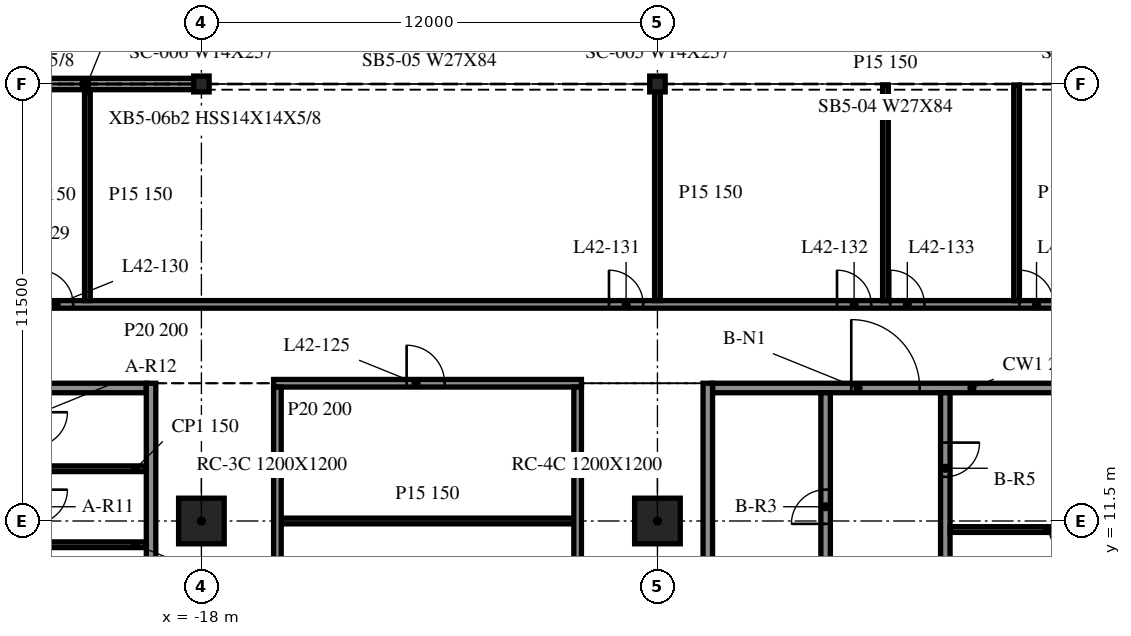
"""IFC4 building model, lengths in metres.
Left out: names, types, materials, properties, quantities, classifications, styles, units other than length and angle.
Written with IfcOpenShell. Run it as: python <this file> out.ifc"""

import sys

from ifc_helpers import new_model, si_unit, direction, frame, frame_2d, origin, origin_2d, place, context, subcontext, project, spatial, rectangle, i_section, extrude, element, fill, save


model = new_model("IFC4")
c1 = context("Model", 3, precision=1e-05, world=origin(), true_north=direction((0.0, 1.0)))
c2 = subcontext(c1, "Body", "Model", "MODEL_VIEW")
j1 = project(units=[si_unit("LENGTHUNIT", "METRE"), si_unit("PLANEANGLEUNIT", "RADIAN")], contexts=[c1])
p1 = place(None, origin())
s1 = spatial("IfcSite", under=j1, at=p1, CompositionType="ELEMENT")
p2 = place(p1, origin())
s2 = spatial("IfcBuilding", under=s1, at=p2, CompositionType="ELEMENT")
p3 = place(p2, frame((0.0, 0.0, 178.2)))
s3 = spatial("IfcBuildingStorey", under=s2, at=p3, CompositionType="ELEMENT", Elevation=178.2)
for number, where, z_axis, x_axis in (
    (1, (-18.0, 11.5, -0.34), (0.0, 0.0, 1.0), (1.0, 0.0, 0.0)),
    (2, (-6.0, 11.5, -0.34), (0.0, 0.0, 1.0), (1.0, 0.0, 0.0)),
):
    element("IfcColumn", number, at=place(p3, frame(where, z_axis=z_axis, x_axis=x_axis)), inside=s3, PredefinedType="COLUMN", context=c2, shape_type="SweptSolid", body=[
        extrude(rectangle(XDim=1.2, YDim=1.2, at=origin_2d()), origin(), (0.0, 0.0, 1.0), 3.8),
    ])
for number, where, z_axis, x_axis in (
    (3, (-6.0, 23.0, -0.34), (0.0, 0.0, 1.0), (1.0, 0.0, 0.0)),
    (4, (-18.0, 23.0, -0.34), (0.0, 0.0, 1.0), (1.0, 0.0, 0.0)),
):
    element("IfcColumn", number, at=place(p3, frame(where, z_axis=z_axis, x_axis=x_axis)), inside=s3, PredefinedType="COLUMN", context=c2, shape_type="SweptSolid", body=[
        extrude(i_section(OverallWidth=0.406, OverallDepth=0.417, WebThickness=0.03, FlangeThickness=0.048, at=origin_2d()), origin(), (0.0, 0.0, 1.0), 3.8),
    ])
p4 = place(p3, frame((-18.015, 23.0, 0.0), z_axis=(0.0, 0.0, 1.0), x_axis=(-1.0, 0.0, 0.0)))
e5 = element("IfcWall", 5, at=p4, inside=s3, PredefinedType="NOTDEFINED", context=c2, shape_type="SweptSolid", body=[
    extrude(rectangle(XDim=11.97, YDim=0.3, at=frame_2d((5.985, 0.0))), origin(), (0.0, 0.0, 1.0), 2.782),
])
p5 = place(p3, frame((-19.325, -9.125, 0.0), z_axis=(0.0, 0.0, 1.0), x_axis=(0.0, 1.0, 0.0)))
e6 = element("IfcWall", 6, at=p5, inside=s3, PredefinedType="SOLIDWALL", context=c2, shape_type="SweptSolid", body=[
    extrude(rectangle(XDim=24.25, YDim=0.25, at=frame_2d((12.125, 0.0))), origin(), (0.0, 0.0, 1.0), 3.46),
])
p6 = place(p3, frame((-28.55, 15.0, 0.0), z_axis=(0.0, 0.0, 1.0), x_axis=(1.0, 0.0, 0.0)))
e7 = element("IfcWall", 7, at=p6, inside=s3, PredefinedType="SOLIDWALL", context=c2, shape_type="SweptSolid", body=[
    extrude(rectangle(XDim=9.1, YDim=0.25, at=frame_2d((4.55, 0.0))), origin(), (0.0, 0.0, 1.0), 3.46),
])
p7 = place(p6, frame((3.65, 0.0, 0.0)))
e8 = element("IfcOpeningElement", 8, at=p7, cuts=e7, PredefinedType="OPENING", context=c2, shape_type="SweptSolid", body=[
    extrude(rectangle(XDim=1.8, YDim=2.1, at=frame_2d((0.9, 1.05))), frame((0.0, 0.135, 0.0), z_axis=(0.0, -1.0, 0.0), x_axis=(1.0, 0.0, 0.0)), (0.0, 0.0, 1.0), 0.27),
])
for number, where, z_axis, x_axis in (
    (9, (-22.3, 10.875, 0.0), (0.0, 0.0, 1.0), (1.0, 0.0, 0.0)),
    (10, (-22.3, 12.875, 0.0), (0.0, 0.0, 1.0), (1.0, 0.0, 0.0)),
):
    element("IfcWall", number, at=place(p3, frame(where, z_axis=z_axis, x_axis=x_axis)), inside=s3, PredefinedType="PARTITIONING", context=c2, shape_type="SweptSolid", body=[
        extrude(rectangle(XDim=2.85, YDim=0.15, at=frame_2d((1.425, 0.0))), origin(), (0.0, 0.0, 1.0), 3.46),
    ])
p8 = place(p3, frame((-4.675, 15.125, 0.0), z_axis=(0.0, 0.0, 1.0), x_axis=(0.0, -1.0, 0.0)))
e11 = element("IfcWall", 11, at=p8, inside=s3, PredefinedType="SOLIDWALL", context=c2, shape_type="SweptSolid", body=[
    extrude(rectangle(XDim=24.25, YDim=0.25, at=frame_2d((12.125, 0.0))), origin(), (0.0, 0.0, 1.0), 3.46),
])
p9 = place(p3, frame((-4.55, 15.0, 0.0), z_axis=(0.0, 0.0, 1.0), x_axis=(1.0, 0.0, 0.0)))
e12 = element("IfcWall", 12, at=p9, inside=s3, PredefinedType="SOLIDWALL", context=c2, shape_type="SweptSolid", body=[
    extrude(rectangle(XDim=9.1, YDim=0.25, at=frame_2d((4.55, 0.0))), origin(), (0.0, 0.0, 1.0), 3.46),
])
p10 = place(p9, frame((3.65, 0.0, 0.0)))
e13 = element("IfcOpeningElement", 13, at=p10, cuts=e12, PredefinedType="OPENING", context=c2, shape_type="SweptSolid", body=[
    extrude(rectangle(XDim=1.8, YDim=2.1, at=frame_2d((0.9, 1.05))), frame((0.0, 0.135, 0.0), z_axis=(0.0, -1.0, 0.0), x_axis=(1.0, 0.0, 0.0)), (0.0, 0.0, 1.0), 0.27),
])
p11 = place(p3, frame((-1.575, -8.875, 0.0), z_axis=(0.0, 0.0, 1.0), x_axis=(0.0, 1.0, 0.0)))
e14 = element("IfcWall", 14, at=p11, inside=s3, PredefinedType="SOLIDWALL", context=c2, shape_type="SweptSolid", body=[
    extrude(rectangle(XDim=23.75, YDim=0.25, at=frame_2d((11.875, 0.0))), origin(), (0.0, 0.0, 1.0), 3.46),
])
p12 = place(p11, frame((7.2, 0.0, 0.0)))
e15 = element("IfcOpeningElement", 15, at=p12, cuts=e14, PredefinedType="OPENING", context=c2, shape_type="SweptSolid", body=[
    extrude(rectangle(XDim=1.1, YDim=2.1, at=frame_2d((0.55, 1.05))), frame((0.0, 0.135, 0.0), z_axis=(0.0, -1.0, 0.0), x_axis=(1.0, 0.0, 0.0)), (0.0, 0.0, 1.0), 0.27),
])
p13 = place(p11, frame((9.95, 0.0, 0.0)))
e16 = element("IfcOpeningElement", 16, at=p13, cuts=e14, PredefinedType="OPENING", context=c2, shape_type="SweptSolid", body=[
    extrude(rectangle(XDim=1.1, YDim=2.1, at=frame_2d((0.55, 1.05))), frame((0.0, 0.135, 0.0), z_axis=(0.0, -1.0, 0.0), x_axis=(1.0, 0.0, 0.0)), (0.0, 0.0, 1.0), 0.27),
])
p14 = place(p11, frame((12.7, 0.0, 0.0)))
e17 = element("IfcOpeningElement", 17, at=p14, cuts=e14, PredefinedType="OPENING", context=c2, shape_type="SweptSolid", body=[
    extrude(rectangle(XDim=1.1, YDim=2.1, at=frame_2d((0.55, 1.05))), frame((0.0, 0.135, 0.0), z_axis=(0.0, -1.0, 0.0), x_axis=(1.0, 0.0, 0.0)), (0.0, 0.0, 1.0), 0.27),
])
p15 = place(p11, frame((15.45, 0.0, 0.0)))
e18 = element("IfcOpeningElement", 18, at=p15, cuts=e14, PredefinedType="OPENING", context=c2, shape_type="SweptSolid", body=[
    extrude(rectangle(XDim=1.1, YDim=2.1, at=frame_2d((0.55, 1.05))), frame((0.0, 0.135, 0.0), z_axis=(0.0, -1.0, 0.0), x_axis=(1.0, 0.0, 0.0)), (0.0, 0.0, 1.0), 0.27),
])
p16 = place(p11, frame((0.712, 0.0, 0.0)))
e19 = element("IfcOpeningElement", 19, at=p16, cuts=e14, PredefinedType="OPENING", context=c2, shape_type="SweptSolid", body=[
    extrude(rectangle(XDim=0.9, YDim=2.1, at=frame_2d((0.45, 1.05))), frame((0.0, 0.135, 0.0), z_axis=(0.0, -1.0, 0.0), x_axis=(1.0, 0.0, 0.0)), (0.0, 0.0, 1.0), 0.27),
])
p17 = place(p11, frame((3.788, 0.0, 0.0)))
e20 = element("IfcOpeningElement", 20, at=p17, cuts=e14, PredefinedType="OPENING", context=c2, shape_type="SweptSolid", body=[
    extrude(rectangle(XDim=0.9, YDim=2.1, at=frame_2d((0.45, 1.05))), frame((0.0, 0.135, 0.0), z_axis=(0.0, -1.0, 0.0), x_axis=(1.0, 0.0, 0.0)), (0.0, 0.0, 1.0), 0.27),
])
p18 = place(p11, frame((20.3, 0.0, 0.0)))
e21 = element("IfcOpeningElement", 21, at=p18, cuts=e14, PredefinedType="OPENING", context=c2, shape_type="SweptSolid", body=[
    extrude(rectangle(XDim=0.9, YDim=2.1, at=frame_2d((0.45, 1.05))), frame((0.0, 0.135, 0.0), z_axis=(0.0, -1.0, 0.0), x_axis=(1.0, 0.0, 0.0)), (0.0, 0.0, 1.0), 0.27),
])
p19 = place(p3, frame((1.575, 14.875, 0.0), z_axis=(0.0, 0.0, 1.0), x_axis=(0.0, -1.0, 0.0)))
e22 = element("IfcWall", 22, at=p19, inside=s3, PredefinedType="SOLIDWALL", context=c2, shape_type="SweptSolid", body=[
    extrude(rectangle(XDim=17.5, YDim=0.25, at=frame_2d((8.75, 0.0))), origin(), (0.0, 0.0, 1.0), 3.46),
])
p20 = place(p19, frame((15.45, 0.0, 0.0)))
e23 = element("IfcOpeningElement", 23, at=p20, cuts=e22, PredefinedType="OPENING", context=c2, shape_type="SweptSolid", body=[
    extrude(rectangle(XDim=1.1, YDim=2.1, at=frame_2d((0.55, 1.05))), frame((0.0, 0.135, 0.0), z_axis=(0.0, -1.0, 0.0), x_axis=(1.0, 0.0, 0.0)), (0.0, 0.0, 1.0), 0.27),
])
p21 = place(p19, frame((12.7, 0.0, 0.0)))
e24 = element("IfcOpeningElement", 24, at=p21, cuts=e22, PredefinedType="OPENING", context=c2, shape_type="SweptSolid", body=[
    extrude(rectangle(XDim=1.1, YDim=2.1, at=frame_2d((0.55, 1.05))), frame((0.0, 0.135, 0.0), z_axis=(0.0, -1.0, 0.0), x_axis=(1.0, 0.0, 0.0)), (0.0, 0.0, 1.0), 0.27),
])
p22 = place(p19, frame((9.95, 0.0, 0.0)))
e25 = element("IfcOpeningElement", 25, at=p22, cuts=e22, PredefinedType="OPENING", context=c2, shape_type="SweptSolid", body=[
    extrude(rectangle(XDim=1.1, YDim=2.1, at=frame_2d((0.55, 1.05))), frame((0.0, 0.135, 0.0), z_axis=(0.0, -1.0, 0.0), x_axis=(1.0, 0.0, 0.0)), (0.0, 0.0, 1.0), 0.27),
])
p23 = place(p19, frame((7.2, 0.0, 0.0)))
e26 = element("IfcOpeningElement", 26, at=p23, cuts=e22, PredefinedType="OPENING", context=c2, shape_type="SweptSolid", body=[
    extrude(rectangle(XDim=1.1, YDim=2.1, at=frame_2d((0.55, 1.05))), frame((0.0, 0.135, 0.0), z_axis=(0.0, -1.0, 0.0), x_axis=(1.0, 0.0, 0.0)), (0.0, 0.0, 1.0), 0.27),
])
p24 = place(p19, frame((4.387, 0.0, 0.0)))
e27 = element("IfcOpeningElement", 27, at=p24, cuts=e22, PredefinedType="OPENING", context=c2, shape_type="SweptSolid", body=[
    extrude(rectangle(XDim=0.9, YDim=2.1, at=frame_2d((0.45, 1.05))), frame((0.0, 0.135, 0.0), z_axis=(0.0, -1.0, 0.0), x_axis=(1.0, 0.0, 0.0)), (0.0, 0.0, 1.0), 0.27),
])
p25 = place(p19, frame((1.312, 0.0, 0.0)))
e28 = element("IfcOpeningElement", 28, at=p25, cuts=e22, PredefinedType="OPENING", context=c2, shape_type="SweptSolid", body=[
    extrude(rectangle(XDim=0.9, YDim=2.1, at=frame_2d((0.45, 1.05))), frame((0.0, 0.135, 0.0), z_axis=(0.0, -1.0, 0.0), x_axis=(1.0, 0.0, 0.0)), (0.0, 0.0, 1.0), 0.27),
])
p26 = place(p3, frame((1.7, 11.275, 0.0), z_axis=(0.0, 0.0, 1.0), x_axis=(1.0, 0.0, 0.0)))
e29 = element("IfcWall", 29, at=p26, inside=s3, PredefinedType="PARTITIONING", context=c2, shape_type="SweptSolid", body=[
    extrude(rectangle(XDim=2.85, YDim=0.15, at=frame_2d((1.425, 0.0))), origin(), (0.0, 0.0, 1.0), 3.46),
])
p27 = place(p3, frame((-15.9, 11.5, 0.0), z_axis=(0.0, 0.0, 1.0), x_axis=(1.0, 0.0, 0.0)))
e30 = element("IfcWall", 30, at=p27, inside=s3, PredefinedType="PARTITIONING", context=c2, shape_type="SweptSolid", body=[
    extrude(rectangle(XDim=7.7, YDim=0.15, at=frame_2d((3.85, 0.0))), origin(), (0.0, 0.0, 1.0), 3.46),
])
p28 = place(p3, frame((-16.1, 15.125, 0.0), z_axis=(0.0, 0.0, 1.0), x_axis=(1.0, 0.0, 0.0)))
e31 = element("IfcWall", 31, at=p28, inside=s3, PredefinedType="PARTITIONING", context=c2, shape_type="SweptSolid", body=[
    extrude(rectangle(XDim=8.1, YDim=0.2, at=frame_2d((4.05, 0.0))), origin(), (0.0, 0.0, 1.0), 3.46),
])
p29 = place(p28, frame((3.5, 0.0, 0.0)))
e32 = element("IfcOpeningElement", 32, at=p29, cuts=e31, PredefinedType="OPENING", context=c2, shape_type="SweptSolid", body=[
    extrude(rectangle(XDim=1.0, YDim=2.1, at=frame_2d((0.5, 1.05))), frame((0.0, 0.11, 0.0), z_axis=(0.0, -1.0, 0.0), x_axis=(1.0, 0.0, 0.0)), (0.0, 0.0, 1.0), 0.22),
])
p30 = place(p3, frame((-47.975, 17.2, 0.0), z_axis=(0.0, 0.0, 1.0), x_axis=(1.0, 0.0, 0.0)))
e33 = element("IfcWall", 33, at=p30, inside=s3, PredefinedType="PARTITIONING", context=c2, shape_type="SweptSolid", body=[
    extrude(rectangle(XDim=95.95, YDim=0.2, at=frame_2d((47.975, 0.0))), origin(), (0.0, 0.0, 1.0), 3.46),
])
p31 = place(p30, frame((13.7, 0.0, 0.0)))
e34 = element("IfcOpeningElement", 34, at=p31, cuts=e33, PredefinedType="OPENING", context=c2, shape_type="SweptSolid", body=[
    extrude(rectangle(XDim=0.9, YDim=2.1, at=frame_2d((0.45, 1.05))), frame((0.0, 0.11, 0.0), z_axis=(0.0, -1.0, 0.0), x_axis=(1.0, 0.0, 0.0)), (0.0, 0.0, 1.0), 0.22),
])
p32 = place(p30, frame((19.7, 0.0, 0.0)))
e35 = element("IfcOpeningElement", 35, at=p32, cuts=e33, PredefinedType="OPENING", context=c2, shape_type="SweptSolid", body=[
    extrude(rectangle(XDim=0.9, YDim=2.1, at=frame_2d((0.45, 1.05))), frame((0.0, 0.11, 0.0), z_axis=(0.0, -1.0, 0.0), x_axis=(1.0, 0.0, 0.0)), (0.0, 0.0, 1.0), 0.22),
])
p33 = place(p30, frame((23.1, 0.0, 0.0)))
e36 = element("IfcOpeningElement", 36, at=p33, cuts=e33, PredefinedType="OPENING", context=c2, shape_type="SweptSolid", body=[
    extrude(rectangle(XDim=0.9, YDim=2.1, at=frame_2d((0.45, 1.05))), frame((0.0, 0.11, 0.0), z_axis=(0.0, -1.0, 0.0), x_axis=(1.0, 0.0, 0.0)), (0.0, 0.0, 1.0), 0.22),
])
p34 = place(p30, frame((25.7, 0.0, 0.0)))
e37 = element("IfcOpeningElement", 37, at=p34, cuts=e33, PredefinedType="OPENING", context=c2, shape_type="SweptSolid", body=[
    extrude(rectangle(XDim=0.9, YDim=2.1, at=frame_2d((0.45, 1.05))), frame((0.0, 0.11, 0.0), z_axis=(0.0, -1.0, 0.0), x_axis=(1.0, 0.0, 0.0)), (0.0, 0.0, 1.0), 0.22),
])
p35 = place(p30, frame((40.7, 0.0, 0.0)))
e38 = element("IfcOpeningElement", 38, at=p35, cuts=e33, PredefinedType="OPENING", context=c2, shape_type="SweptSolid", body=[
    extrude(rectangle(XDim=0.9, YDim=2.1, at=frame_2d((0.45, 1.05))), frame((0.0, 0.11, 0.0), z_axis=(0.0, -1.0, 0.0), x_axis=(1.0, 0.0, 0.0)), (0.0, 0.0, 1.0), 0.22),
])
p36 = place(p30, frame((46.7, 0.0, 0.0)))
e39 = element("IfcOpeningElement", 39, at=p36, cuts=e33, PredefinedType="OPENING", context=c2, shape_type="SweptSolid", body=[
    extrude(rectangle(XDim=0.9, YDim=2.1, at=frame_2d((0.45, 1.05))), frame((0.0, 0.11, 0.0), z_axis=(0.0, -1.0, 0.0), x_axis=(1.0, 0.0, 0.0)), (0.0, 0.0, 1.0), 0.22),
])
p37 = place(p30, frame((48.1, 0.0, 0.0)))
e40 = element("IfcOpeningElement", 40, at=p37, cuts=e33, PredefinedType="OPENING", context=c2, shape_type="SweptSolid", body=[
    extrude(rectangle(XDim=0.9, YDim=2.1, at=frame_2d((0.45, 1.05))), frame((0.0, 0.11, 0.0), z_axis=(0.0, -1.0, 0.0), x_axis=(1.0, 0.0, 0.0)), (0.0, 0.0, 1.0), 0.22),
])
p38 = place(p30, frame((51.5, 0.0, 0.0)))
e41 = element("IfcOpeningElement", 41, at=p38, cuts=e33, PredefinedType="OPENING", context=c2, shape_type="SweptSolid", body=[
    extrude(rectangle(XDim=0.9, YDim=2.1, at=frame_2d((0.45, 1.05))), frame((0.0, 0.11, 0.0), z_axis=(0.0, -1.0, 0.0), x_axis=(1.0, 0.0, 0.0)), (0.0, 0.0, 1.0), 0.22),
])
p39 = place(p30, frame((54.5, 0.0, 0.0)))
e42 = element("IfcOpeningElement", 42, at=p39, cuts=e33, PredefinedType="OPENING", context=c2, shape_type="SweptSolid", body=[
    extrude(rectangle(XDim=0.9, YDim=2.1, at=frame_2d((0.45, 1.05))), frame((0.0, 0.11, 0.0), z_axis=(0.0, -1.0, 0.0), x_axis=(1.0, 0.0, 0.0)), (0.0, 0.0, 1.0), 0.22),
])
p40 = place(p30, frame((69.1, 0.0, 0.0)))
e43 = element("IfcOpeningElement", 43, at=p40, cuts=e33, PredefinedType="OPENING", context=c2, shape_type="SweptSolid", body=[
    extrude(rectangle(XDim=0.9, YDim=2.1, at=frame_2d((0.45, 1.05))), frame((0.0, 0.11, 0.0), z_axis=(0.0, -1.0, 0.0), x_axis=(1.0, 0.0, 0.0)), (0.0, 0.0, 1.0), 0.22),
])
p41 = place(p30, frame((75.1, 0.0, 0.0)))
e44 = element("IfcOpeningElement", 44, at=p41, cuts=e33, PredefinedType="OPENING", context=c2, shape_type="SweptSolid", body=[
    extrude(rectangle(XDim=0.9, YDim=2.1, at=frame_2d((0.45, 1.05))), frame((0.0, 0.11, 0.0), z_axis=(0.0, -1.0, 0.0), x_axis=(1.0, 0.0, 0.0)), (0.0, 0.0, 1.0), 0.22),
])
p42 = place(p30, frame((78.1, 0.0, 0.0)))
e45 = element("IfcOpeningElement", 45, at=p42, cuts=e33, PredefinedType="OPENING", context=c2, shape_type="SweptSolid", body=[
    extrude(rectangle(XDim=0.9, YDim=2.1, at=frame_2d((0.45, 1.05))), frame((0.0, 0.11, 0.0), z_axis=(0.0, -1.0, 0.0), x_axis=(1.0, 0.0, 0.0)), (0.0, 0.0, 1.0), 0.22),
])
p43 = place(p30, frame((81.1, 0.0, 0.0)))
e46 = element("IfcOpeningElement", 46, at=p43, cuts=e33, PredefinedType="OPENING", context=c2, shape_type="SweptSolid", body=[
    extrude(rectangle(XDim=0.9, YDim=2.1, at=frame_2d((0.45, 1.05))), frame((0.0, 0.11, 0.0), z_axis=(0.0, -1.0, 0.0), x_axis=(1.0, 0.0, 0.0)), (0.0, 0.0, 1.0), 0.22),
])
p44 = place(p3, frame((-21.0, 17.3, 0.0), z_axis=(0.0, 0.0, 1.0), x_axis=(0.0, 1.0, 0.0)))
e47 = element("IfcWall", 47, at=p44, inside=s3, PredefinedType="PARTITIONING", context=c2, shape_type="SweptSolid", body=[
    extrude(rectangle(XDim=5.55, YDim=0.15, at=frame_2d((2.775, 0.0))), origin(), (0.0, 0.0, 1.0), 3.46),
])
p45 = place(p3, frame((-16.0, -9.025, 0.0), z_axis=(0.0, 0.0, 1.0), x_axis=(0.0, 1.0, 0.0)))
e48 = element("IfcWall", 48, at=p45, inside=s3, PredefinedType="PARTITIONING", context=c2, shape_type="SweptSolid", body=[
    extrude(rectangle(XDim=24.05, YDim=0.2, at=frame_2d((12.025, 0.0))), origin(), (0.0, 0.0, 1.0), 3.46),
])
p46 = place(p45, frame((11.5, 0.0, 0.0)))
e49 = element("IfcOpeningElement", 49, at=p46, cuts=e48, PredefinedType="OPENING", context=c2, shape_type="SweptSolid", body=[
    extrude(rectangle(XDim=0.9, YDim=2.1, at=frame_2d((0.45, 1.05))), frame((0.0, 0.11, 0.0), z_axis=(0.0, -1.0, 0.0), x_axis=(1.0, 0.0, 0.0)), (0.0, 0.0, 1.0), 0.22),
])
p47 = place(p3, frame((-8.1, -9.025, 0.0), z_axis=(0.0, 0.0, 1.0), x_axis=(0.0, 1.0, 0.0)))
e50 = element("IfcWall", 50, at=p47, inside=s3, PredefinedType="PARTITIONING", context=c2, shape_type="SweptSolid", body=[
    extrude(rectangle(XDim=24.05, YDim=0.2, at=frame_2d((12.025, 0.0))), origin(), (0.0, 0.0, 1.0), 3.46),
])
for number, where, z_axis, x_axis in (
    (51, (-6.0, 17.3, 0.0), (0.0, 0.0, 1.0), (0.0, 1.0, 0.0)),
    (52, (0.0, 17.3, 0.0), (0.0, 0.0, 1.0), (0.0, 1.0, 0.0)),
    (53, (3.45, 17.3, 0.0), (0.0, 0.0, 1.0), (0.0, 1.0, 0.0)),
):
    element("IfcWall", number, at=place(p3, frame(where, z_axis=z_axis, x_axis=x_axis)), inside=s3, PredefinedType="PARTITIONING", context=c2, shape_type="SweptSolid", body=[
        extrude(rectangle(XDim=5.675, YDim=0.15, at=frame_2d((2.837, 0.0))), origin(), (0.0, 0.0, 1.0), 3.46),
    ])
p48 = place(p10, origin())
e54 = element("IfcDoor", 54, at=p48, inside=s3, OperationType="DOUBLE_DOOR_SINGLE_SWING", PredefinedType="DOOR", context=c2, shape_type="SweptSolid", body=[
    extrude(rectangle(XDim=1.8, YDim=2.1, at=frame_2d((0.9, 1.05))), frame((0.0, 0.025, 0.0), z_axis=(0.0, -1.0, 0.0), x_axis=(1.0, 0.0, 0.0)), (0.0, 0.0, 1.0), 0.05),
])
fill(e13, e54)
p49 = place(p18, origin())
e55 = element("IfcDoor", 55, at=p49, inside=s3, OperationType="SINGLE_SWING_LEFT", PredefinedType="DOOR", context=c2, shape_type="SweptSolid", body=[
    extrude(rectangle(XDim=0.9, YDim=2.1, at=frame_2d((0.45, 1.05))), frame((0.0, 0.025, 0.0), z_axis=(0.0, -1.0, 0.0), x_axis=(1.0, 0.0, 0.0)), (0.0, 0.0, 1.0), 0.05),
])
fill(e21, e55)
p50 = place(p25, origin())
e56 = element("IfcDoor", 56, at=p50, inside=s3, OperationType="SINGLE_SWING_LEFT", PredefinedType="DOOR", context=c2, shape_type="SweptSolid", body=[
    extrude(rectangle(XDim=0.9, YDim=2.1, at=frame_2d((0.45, 1.05))), frame((0.0, 0.025, 0.0), z_axis=(0.0, -1.0, 0.0), x_axis=(1.0, 0.0, 0.0)), (0.0, 0.0, 1.0), 0.05),
])
fill(e28, e56)
p51 = place(p29, origin())
e57 = element("IfcDoor", 57, at=p51, inside=s3, OperationType="SINGLE_SWING_RIGHT", PredefinedType="DOOR", context=c2, shape_type="SweptSolid", body=[
    extrude(rectangle(XDim=1.0, YDim=2.1, at=frame_2d((0.5, 1.05))), frame((0.0, 0.025, 0.0), z_axis=(0.0, -1.0, 0.0), x_axis=(1.0, 0.0, 0.0)), (0.0, 0.0, 1.0), 0.05),
])
fill(e32, e57)
p52 = place(p34, origin())
e58 = element("IfcDoor", 58, at=p52, inside=s3, OperationType="SINGLE_SWING_LEFT", PredefinedType="DOOR", context=c2, shape_type="SweptSolid", body=[
    extrude(rectangle(XDim=0.9, YDim=2.1, at=frame_2d((0.45, 1.05))), frame((0.0, 0.025, 0.0), z_axis=(0.0, -1.0, 0.0), x_axis=(1.0, 0.0, 0.0)), (0.0, 0.0, 1.0), 0.05),
])
fill(e37, e58)
p53 = place(p35, origin())
e59 = element("IfcDoor", 59, at=p53, inside=s3, OperationType="SINGLE_SWING_LEFT", PredefinedType="DOOR", context=c2, shape_type="SweptSolid", body=[
    extrude(rectangle(XDim=0.9, YDim=2.1, at=frame_2d((0.45, 1.05))), frame((0.0, 0.025, 0.0), z_axis=(0.0, -1.0, 0.0), x_axis=(1.0, 0.0, 0.0)), (0.0, 0.0, 1.0), 0.05),
])
fill(e38, e59)
p54 = place(p36, origin())
e60 = element("IfcDoor", 60, at=p54, inside=s3, OperationType="SINGLE_SWING_LEFT", PredefinedType="DOOR", context=c2, shape_type="SweptSolid", body=[
    extrude(rectangle(XDim=0.9, YDim=2.1, at=frame_2d((0.45, 1.05))), frame((0.0, 0.025, 0.0), z_axis=(0.0, -1.0, 0.0), x_axis=(1.0, 0.0, 0.0)), (0.0, 0.0, 1.0), 0.05),
])
fill(e39, e60)
p55 = place(p37, origin())
e61 = element("IfcDoor", 61, at=p55, inside=s3, OperationType="SINGLE_SWING_RIGHT", PredefinedType="DOOR", context=c2, shape_type="SweptSolid", body=[
    extrude(rectangle(XDim=0.9, YDim=2.1, at=frame_2d((0.45, 1.05))), frame((0.0, 0.025, 0.0), z_axis=(0.0, -1.0, 0.0), x_axis=(1.0, 0.0, 0.0)), (0.0, 0.0, 1.0), 0.05),
])
fill(e40, e61)
p56 = place(p38, origin())
e62 = element("IfcDoor", 62, at=p56, inside=s3, OperationType="SINGLE_SWING_RIGHT", PredefinedType="DOOR", context=c2, shape_type="SweptSolid", body=[
    extrude(rectangle(XDim=0.9, YDim=2.1, at=frame_2d((0.45, 1.05))), frame((0.0, 0.025, 0.0), z_axis=(0.0, -1.0, 0.0), x_axis=(1.0, 0.0, 0.0)), (0.0, 0.0, 1.0), 0.05),
])
fill(e41, e62)
save(model, sys.argv[1])
